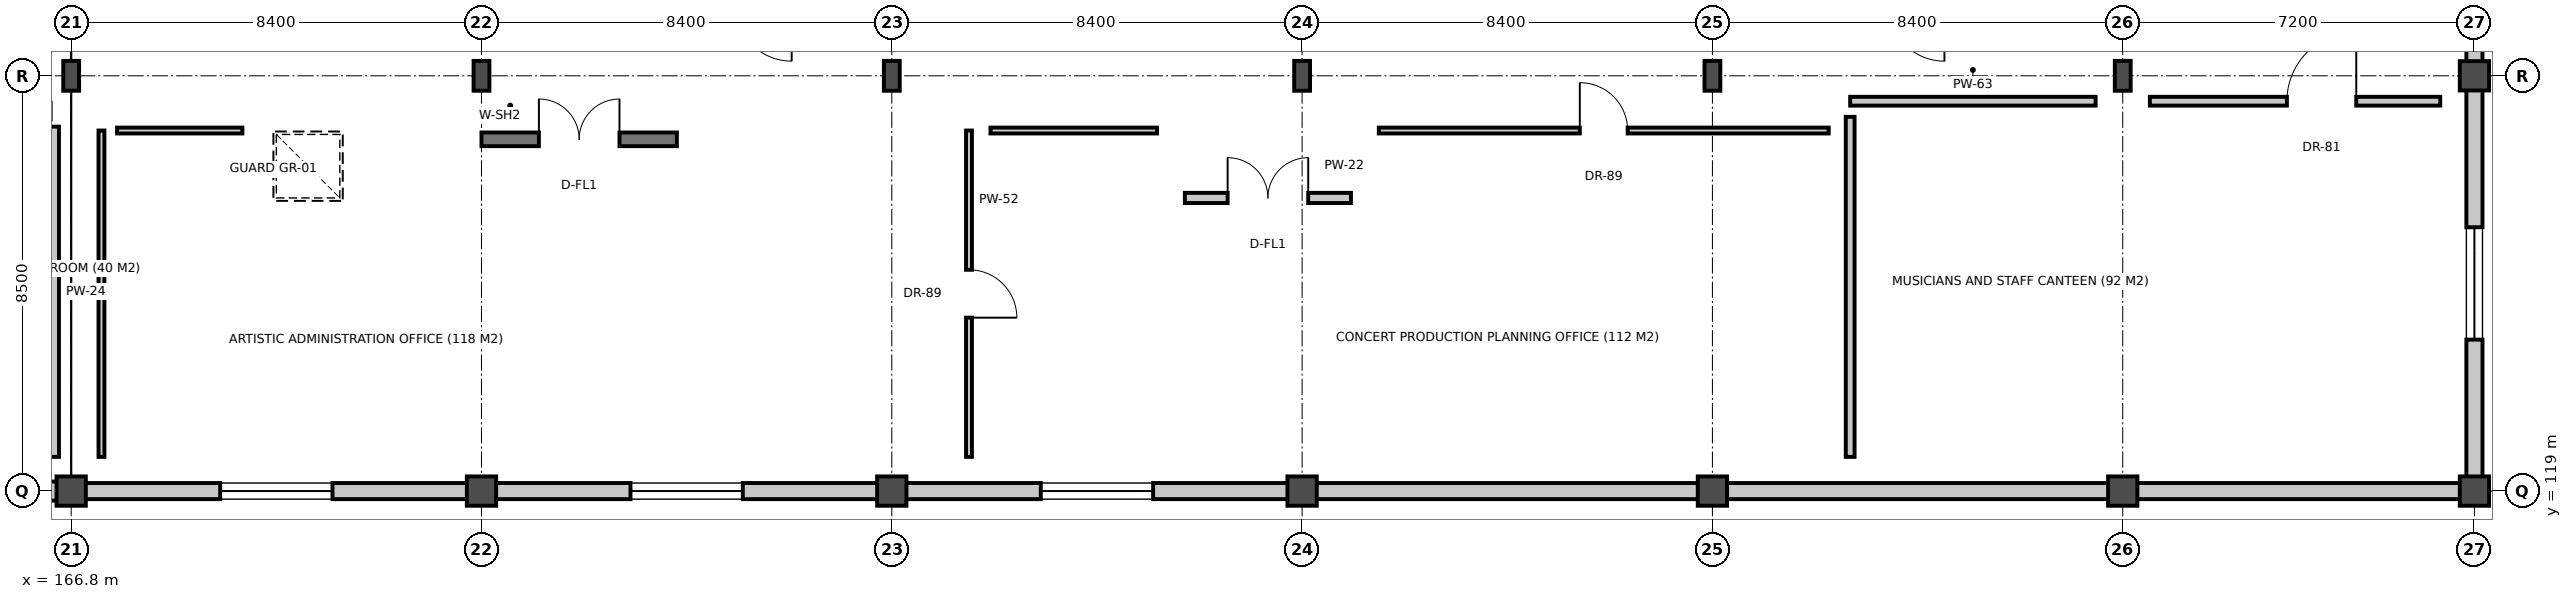
"""IFC4 building model, lengths in metres.
Left out: names, types, materials, properties, quantities, classifications, styles, units other than length and angle.
Written with IfcOpenShell. Run it as: python <this file> out.ifc"""

import sys

from ifc_helpers import new_model, si_unit, direction, frame, frame_2d, origin, origin_2d, place, context, subcontext, project, spatial, rectangle, i_section, extrude, element, fill, save


model = new_model("IFC4")
c1 = context("Model", 3, precision=1e-05, world=origin(), true_north=direction((0.0, 1.0)))
c2 = subcontext(c1, "Body", "Model", "MODEL_VIEW")
j1 = project(units=[si_unit("LENGTHUNIT", "METRE"), si_unit("PLANEANGLEUNIT", "RADIAN")], contexts=[c1])
p1 = place(None, origin())
s1 = spatial("IfcSite", under=j1, at=p1, CompositionType="ELEMENT")
p2 = place(p1, origin())
s2 = spatial("IfcBuilding", under=s1, at=p2, CompositionType="ELEMENT")
p3 = place(p2, frame((0.0, 0.0, 23.7)))
s3 = spatial("IfcBuildingStorey", under=s2, at=p3, CompositionType="ELEMENT", Elevation=23.7)
p4 = place(p3, frame((166.8, 119.0, 0.0), z_axis=(0.0, 0.0, 1.0), x_axis=(1.0, 0.0, 0.0)))
e1 = element("IfcColumn", 1, at=p4, inside=s3, PredefinedType="COLUMN", context=c2, shape_type="SweptSolid", body=[
    extrude(rectangle(XDim=0.6, YDim=0.6, at=origin_2d()), origin(), (0.0, 0.0, 1.0), 4.2),
])
p5 = place(p3, frame((166.8, 127.5, 0.0), z_axis=(0.0, 0.0, 1.0), x_axis=(1.0, 0.0, 0.0)))
e2 = element("IfcColumn", 2, at=p5, inside=s3, PredefinedType="COLUMN", context=c2, shape_type="SweptSolid", body=[
    extrude(i_section(OverallWidth=0.324, OverallDepth=0.611, WebThickness=0.013, FlangeThickness=0.019, at=origin_2d()), origin(), (0.0, 0.0, 1.0), 4.2),
])
p6 = place(p3, frame((175.2, 119.0, 0.0), z_axis=(0.0, 0.0, 1.0), x_axis=(1.0, 0.0, 0.0)))
e3 = element("IfcColumn", 3, at=p6, inside=s3, PredefinedType="COLUMN", context=c2, shape_type="SweptSolid", body=[
    extrude(rectangle(XDim=0.6, YDim=0.6, at=origin_2d()), origin(), (0.0, 0.0, 1.0), 4.2),
])
p7 = place(p3, frame((175.2, 127.5, 0.0), z_axis=(0.0, 0.0, 1.0), x_axis=(1.0, 0.0, 0.0)))
e4 = element("IfcColumn", 4, at=p7, inside=s3, PredefinedType="COLUMN", context=c2, shape_type="SweptSolid", body=[
    extrude(i_section(OverallWidth=0.324, OverallDepth=0.611, WebThickness=0.013, FlangeThickness=0.019, at=origin_2d()), origin(), (0.0, 0.0, 1.0), 4.2),
])
p8 = place(p3, frame((183.6, 119.0, 0.0), z_axis=(0.0, 0.0, 1.0), x_axis=(1.0, 0.0, 0.0)))
e5 = element("IfcColumn", 5, at=p8, inside=s3, PredefinedType="COLUMN", context=c2, shape_type="SweptSolid", body=[
    extrude(rectangle(XDim=0.6, YDim=0.6, at=origin_2d()), origin(), (0.0, 0.0, 1.0), 4.2),
])
p9 = place(p3, frame((183.6, 127.5, 0.0), z_axis=(0.0, 0.0, 1.0), x_axis=(1.0, 0.0, 0.0)))
e6 = element("IfcColumn", 6, at=p9, inside=s3, PredefinedType="COLUMN", context=c2, shape_type="SweptSolid", body=[
    extrude(i_section(OverallWidth=0.324, OverallDepth=0.611, WebThickness=0.013, FlangeThickness=0.019, at=origin_2d()), origin(), (0.0, 0.0, 1.0), 4.2),
])
p10 = place(p3, frame((192.0, 119.0, 0.0), z_axis=(0.0, 0.0, 1.0), x_axis=(1.0, 0.0, 0.0)))
e7 = element("IfcColumn", 7, at=p10, inside=s3, PredefinedType="COLUMN", context=c2, shape_type="SweptSolid", body=[
    extrude(rectangle(XDim=0.6, YDim=0.6, at=origin_2d()), origin(), (0.0, 0.0, 1.0), 4.2),
])
p11 = place(p3, frame((192.0, 127.5, 0.0), z_axis=(0.0, 0.0, 1.0), x_axis=(1.0, 0.0, 0.0)))
e8 = element("IfcColumn", 8, at=p11, inside=s3, PredefinedType="COLUMN", context=c2, shape_type="SweptSolid", body=[
    extrude(i_section(OverallWidth=0.324, OverallDepth=0.611, WebThickness=0.013, FlangeThickness=0.019, at=origin_2d()), origin(), (0.0, 0.0, 1.0), 4.2),
])
p12 = place(p3, frame((200.4, 119.0, 0.0), z_axis=(0.0, 0.0, 1.0), x_axis=(1.0, 0.0, 0.0)))
e9 = element("IfcColumn", 9, at=p12, inside=s3, PredefinedType="COLUMN", context=c2, shape_type="SweptSolid", body=[
    extrude(rectangle(XDim=0.6, YDim=0.6, at=origin_2d()), origin(), (0.0, 0.0, 1.0), 4.2),
])
p13 = place(p3, frame((200.4, 127.5, 0.0), z_axis=(0.0, 0.0, 1.0), x_axis=(1.0, 0.0, 0.0)))
e10 = element("IfcColumn", 10, at=p13, inside=s3, PredefinedType="COLUMN", context=c2, shape_type="SweptSolid", body=[
    extrude(i_section(OverallWidth=0.324, OverallDepth=0.611, WebThickness=0.013, FlangeThickness=0.019, at=origin_2d()), origin(), (0.0, 0.0, 1.0), 4.2),
])
p14 = place(p3, frame((208.8, 119.0, 0.0), z_axis=(0.0, 0.0, 1.0), x_axis=(1.0, 0.0, 0.0)))
e11 = element("IfcColumn", 11, at=p14, inside=s3, PredefinedType="COLUMN", context=c2, shape_type="SweptSolid", body=[
    extrude(rectangle(XDim=0.6, YDim=0.6, at=origin_2d()), origin(), (0.0, 0.0, 1.0), 4.2),
])
p15 = place(p3, frame((208.8, 127.5, 0.0), z_axis=(0.0, 0.0, 1.0), x_axis=(1.0, 0.0, 0.0)))
e12 = element("IfcColumn", 12, at=p15, inside=s3, PredefinedType="COLUMN", context=c2, shape_type="SweptSolid", body=[
    extrude(i_section(OverallWidth=0.324, OverallDepth=0.611, WebThickness=0.013, FlangeThickness=0.019, at=origin_2d()), origin(), (0.0, 0.0, 1.0), 4.2),
])
for number, where, z_axis, x_axis in (
    (13, (216.0, 119.0, 0.0), (0.0, 0.0, 1.0), (1.0, 0.0, 0.0)),
    (14, (216.0, 127.5, 0.0), (0.0, 0.0, 1.0), (1.0, 0.0, 0.0)),
):
    element("IfcColumn", number, at=place(p3, frame(where, z_axis=z_axis, x_axis=x_axis)), inside=s3, PredefinedType="COLUMN", context=c2, shape_type="SweptSolid", body=[
        extrude(rectangle(XDim=0.6, YDim=0.6, at=origin_2d()), origin(), (0.0, 0.0, 1.0), 4.2),
    ])
p16 = place(p3, frame((216.0, 127.22, 0.0), z_axis=(0.0, 0.0, 1.0), x_axis=(0.0, -1.0, 0.0)))
e15 = element("IfcWall", 15, at=p16, inside=s3, PredefinedType="SOLIDWALL", context=c2, shape_type="SweptSolid", body=[
    extrude(rectangle(XDim=7.94, YDim=0.33, at=frame_2d((3.97, 0.0))), origin(), (0.0, 0.0, 1.0), 3.154),
])
p17 = place(p16, frame((2.82, 0.0, 0.95)))
e16 = element("IfcOpeningElement", 16, at=p17, cuts=e15, PredefinedType="OPENING", context=c2, shape_type="SweptSolid", body=[
    extrude(rectangle(XDim=2.3, YDim=1.75, at=frame_2d((1.15, 0.875))), frame((0.0, 0.175, 0.0), z_axis=(0.0, -1.0, 0.0), x_axis=(1.0, 0.0, 0.0)), (0.0, 0.0, 1.0), 0.35),
])
p18 = place(p3, frame((216.0, 135.72, 0.0), z_axis=(0.0, 0.0, 1.0), x_axis=(0.0, -1.0, 0.0)))
e17 = element("IfcWall", 17, at=p18, inside=s3, PredefinedType="SOLIDWALL", context=c2, shape_type="SweptSolid", body=[
    extrude(rectangle(XDim=7.94, YDim=0.33, at=frame_2d((3.97, 0.0))), origin(), (0.0, 0.0, 1.0), 3.065),
])
p19 = place(p18, frame((2.82, 0.0, 0.95)))
e18 = element("IfcOpeningElement", 18, at=p19, cuts=e17, PredefinedType="OPENING", context=c2, shape_type="SweptSolid", body=[
    extrude(rectangle(XDim=2.3, YDim=1.75, at=frame_2d((1.15, 0.875))), frame((0.0, 0.175, 0.0), z_axis=(0.0, -1.0, 0.0), x_axis=(1.0, 0.0, 0.0)), (0.0, 0.0, 1.0), 0.35),
])
p20 = place(p3, frame((174.92, 119.0, 0.0), z_axis=(0.0, 0.0, 1.0), x_axis=(-1.0, 0.0, 0.0)))
e19 = element("IfcWall", 19, at=p20, inside=s3, PredefinedType="SOLIDWALL", context=c2, shape_type="SweptSolid", body=[
    extrude(rectangle(XDim=7.84, YDim=0.33, at=frame_2d((3.92, 0.0))), origin(), (0.0, 0.0, 1.0), 3.231),
])
p21 = place(p20, frame((2.77, 0.0, 0.95)))
e20 = element("IfcOpeningElement", 20, at=p21, cuts=e19, PredefinedType="OPENING", context=c2, shape_type="SweptSolid", body=[
    extrude(rectangle(XDim=2.3, YDim=1.75, at=frame_2d((1.15, 0.875))), frame((0.0, 0.175, 0.0), z_axis=(0.0, -1.0, 0.0), x_axis=(1.0, 0.0, 0.0)), (0.0, 0.0, 1.0), 0.35),
])
p22 = place(p3, frame((183.32, 119.0, 0.0), z_axis=(0.0, 0.0, 1.0), x_axis=(-1.0, 0.0, 0.0)))
e21 = element("IfcWall", 21, at=p22, inside=s3, PredefinedType="SOLIDWALL", context=c2, shape_type="SweptSolid", body=[
    extrude(rectangle(XDim=7.84, YDim=0.33, at=frame_2d((3.92, 0.0))), origin(), (0.0, 0.0, 1.0), 3.154),
])
p23 = place(p22, frame((2.77, 0.0, 0.95)))
e22 = element("IfcOpeningElement", 22, at=p23, cuts=e21, PredefinedType="OPENING", context=c2, shape_type="SweptSolid", body=[
    extrude(rectangle(XDim=2.3, YDim=1.75, at=frame_2d((1.15, 0.875))), frame((0.0, 0.175, 0.0), z_axis=(0.0, -1.0, 0.0), x_axis=(1.0, 0.0, 0.0)), (0.0, 0.0, 1.0), 0.35),
])
p24 = place(p3, frame((191.72, 119.0, 0.0), z_axis=(0.0, 0.0, 1.0), x_axis=(-1.0, 0.0, 0.0)))
e23 = element("IfcWall", 23, at=p24, inside=s3, PredefinedType="SOLIDWALL", context=c2, shape_type="SweptSolid", body=[
    extrude(rectangle(XDim=7.84, YDim=0.33, at=frame_2d((3.92, 0.0))), origin(), (0.0, 0.0, 1.0), 3.065),
])
p25 = place(p24, frame((2.77, 0.0, 0.95)))
e24 = element("IfcOpeningElement", 24, at=p25, cuts=e23, PredefinedType="OPENING", context=c2, shape_type="SweptSolid", body=[
    extrude(rectangle(XDim=2.3, YDim=1.75, at=frame_2d((1.15, 0.875))), frame((0.0, 0.175, 0.0), z_axis=(0.0, -1.0, 0.0), x_axis=(1.0, 0.0, 0.0)), (0.0, 0.0, 1.0), 0.35),
])
p26 = place(p3, frame((200.12, 119.0, 0.0), z_axis=(0.0, 0.0, 1.0), x_axis=(-1.0, 0.0, 0.0)))
e25 = element("IfcWall", 25, at=p26, inside=s3, PredefinedType="SOLIDWALL", context=c2, shape_type="SweptSolid", body=[
    extrude(rectangle(XDim=7.84, YDim=0.33, at=frame_2d((3.92, 0.0))), origin(), (0.0, 0.0, 1.0), 2.997),
])
p27 = place(p3, frame((208.52, 119.0, 0.0), z_axis=(0.0, 0.0, 1.0), x_axis=(-1.0, 0.0, 0.0)))
e26 = element("IfcWall", 26, at=p27, inside=s3, PredefinedType="SOLIDWALL", context=c2, shape_type="SweptSolid", body=[
    extrude(rectangle(XDim=7.84, YDim=0.33, at=frame_2d((3.92, 0.0))), origin(), (0.0, 0.0, 1.0), 2.898),
])
p28 = place(p3, frame((215.72, 119.0, 0.0), z_axis=(0.0, 0.0, 1.0), x_axis=(-1.0, 0.0, 0.0)))
e27 = element("IfcWall", 27, at=p28, inside=s3, PredefinedType="SOLIDWALL", context=c2, shape_type="SweptSolid", body=[
    extrude(rectangle(XDim=6.64, YDim=0.33, at=frame_2d((3.32, 0.0))), origin(), (0.0, 0.0, 1.0), 3.024),
])
p29 = place(p3, frame((166.52, 119.0, 0.0), z_axis=(0.0, 0.0, 1.0), x_axis=(-1.0, 0.0, 0.0)))
e28 = element("IfcWall", 28, at=p29, inside=s3, PredefinedType="SOLIDWALL", context=c2, shape_type="SweptSolid", body=[
    extrude(rectangle(XDim=7.84, YDim=0.39, at=frame_2d((3.92, 0.0))), origin(), (0.0, 0.0, 1.0), 3.174),
])
p30 = place(p29, frame((3.02, 0.0, 1.1)))
e29 = element("IfcOpeningElement", 29, at=p30, cuts=e28, PredefinedType="OPENING", context=c2, shape_type="SweptSolid", body=[
    extrude(rectangle(XDim=1.8, YDim=1.4, at=frame_2d((0.9, 0.7))), frame((0.0, 0.205, 0.0), z_axis=(0.0, -1.0, 0.0), x_axis=(1.0, 0.0, 0.0)), (0.0, 0.0, 1.0), 0.41),
])
p31 = place(p3, frame((175.2, 126.2, 0.0), z_axis=(0.0, 0.0, 1.0), x_axis=(1.0, 0.0, 0.0)))
e30 = element("IfcWall", 30, at=p31, inside=s3, PredefinedType="SHEAR", context=c2, shape_type="SweptSolid", body=[
    extrude(rectangle(XDim=4.0, YDim=0.28, at=frame_2d((2.0, 0.0))), origin(), (0.0, 0.0, 1.0), 2.898),
])
p32 = place(p31, frame((1.175, 0.0, 0.0)))
e31 = element("IfcOpeningElement", 31, at=p32, cuts=e30, PredefinedType="OPENING", context=c2, shape_type="SweptSolid", body=[
    extrude(rectangle(XDim=1.65, YDim=2.2, at=frame_2d((0.825, 1.1))), frame((0.0, 0.15, 0.0), z_axis=(0.0, -1.0, 0.0), x_axis=(1.0, 0.0, 0.0)), (0.0, 0.0, 1.0), 0.3),
])
p33 = place(p3, frame((189.6, 125.0, 0.0), z_axis=(0.0, 0.0, 1.0), x_axis=(1.0, 0.0, 0.0)))
e32 = element("IfcWall", 32, at=p33, inside=s3, PredefinedType="PARTITIONING", context=c2, shape_type="SweptSolid", body=[
    extrude(rectangle(XDim=3.4, YDim=0.208, at=frame_2d((1.7, 0.0))), origin(), (0.0, 0.0, 1.0), 3.316),
])
p34 = place(p33, frame((0.875, 0.0, 0.0)))
e33 = element("IfcOpeningElement", 33, at=p34, cuts=e32, PredefinedType="OPENING", context=c2, shape_type="SweptSolid", body=[
    extrude(rectangle(XDim=1.65, YDim=2.2, at=frame_2d((0.825, 1.1))), frame((0.0, 0.114, 0.0), z_axis=(0.0, -1.0, 0.0), x_axis=(1.0, 0.0, 0.0)), (0.0, 0.0, 1.0), 0.228),
])
p35 = place(p3, frame((166.38, 126.46, 0.0), z_axis=(0.0, 0.0, 1.0), x_axis=(0.0, -1.0, 0.0)))
e34 = element("IfcWall", 34, at=p35, inside=s3, PredefinedType="PARTITIONING", context=c2, shape_type="SweptSolid", body=[
    extrude(rectangle(XDim=6.76, YDim=0.34, at=frame_2d((3.38, 0.0))), origin(), (0.0, 0.0, 1.0), 2.86),
])
p36 = place(p3, frame((185.18, 126.38, 0.0), z_axis=(0.0, 0.0, 1.0), x_axis=(0.0, -1.0, 0.0)))
e35 = element("IfcWall", 35, at=p36, inside=s3, PredefinedType="PARTITIONING", context=c2, shape_type="SweptSolid", body=[
    extrude(rectangle(XDim=6.68, YDim=0.12, at=frame_2d((3.34, 0.0))), origin(), (0.0, 0.0, 1.0), 2.86),
])
p37 = place(p36, frame((2.85, 0.0, 0.0)))
e36 = element("IfcOpeningElement", 36, at=p37, cuts=e35, PredefinedType="OPENING", context=c2, shape_type="SweptSolid", body=[
    extrude(rectangle(XDim=0.98, YDim=2.16, at=frame_2d((0.49, 1.08))), frame((0.0, 0.07, 0.0), z_axis=(0.0, -1.0, 0.0), x_axis=(1.0, 0.0, 0.0)), (0.0, 0.0, 1.0), 0.14),
])
p38 = place(p3, frame((167.42, 119.7, 0.0), z_axis=(0.0, 0.0, 1.0), x_axis=(0.0, 1.0, 0.0)))
e37 = element("IfcWall", 37, at=p38, inside=s3, PredefinedType="PARTITIONING", context=c2, shape_type="SweptSolid", body=[
    extrude(rectangle(XDim=6.68, YDim=0.12, at=frame_2d((3.34, 0.0))), origin(), (0.0, 0.0, 1.0), 2.86),
])
p39 = place(p3, frame((167.74, 126.38, 0.0), z_axis=(0.0, 0.0, 1.0), x_axis=(1.0, 0.0, 0.0)))
e38 = element("IfcWall", 38, at=p39, inside=s3, PredefinedType="PARTITIONING", context=c2, shape_type="SweptSolid", body=[
    extrude(rectangle(XDim=2.565, YDim=0.12, at=frame_2d((1.283, 0.0))), origin(), (0.0, 0.0, 1.0), 2.86),
])
p40 = place(p3, frame((193.57, 126.38, 0.0), z_axis=(0.0, 0.0, 1.0), x_axis=(1.0, 0.0, 0.0)))
e39 = element("IfcWall", 39, at=p40, inside=s3, PredefinedType="PARTITIONING", context=c2, shape_type="SweptSolid", body=[
    extrude(rectangle(XDim=9.21, YDim=0.12, at=frame_2d((4.605, 0.0))), origin(), (0.0, 0.0, 1.0), 2.86),
])
p41 = place(p40, frame((4.115, 0.0, 0.0)))
e40 = element("IfcOpeningElement", 40, at=p41, cuts=e39, PredefinedType="OPENING", context=c2, shape_type="SweptSolid", body=[
    extrude(rectangle(XDim=0.98, YDim=2.16, at=frame_2d((0.49, 1.08))), frame((0.0, 0.07, 0.0), z_axis=(0.0, -1.0, 0.0), x_axis=(1.0, 0.0, 0.0)), (0.0, 0.0, 1.0), 0.14),
])
p42 = place(p3, frame((185.62, 126.38, 0.0), z_axis=(0.0, 0.0, 1.0), x_axis=(1.0, 0.0, 0.0)))
e41 = element("IfcWall", 41, at=p42, inside=s3, PredefinedType="PARTITIONING", context=c2, shape_type="SweptSolid", body=[
    extrude(rectangle(XDim=3.41, YDim=0.12, at=frame_2d((1.705, 0.0))), origin(), (0.0, 0.0, 1.0), 2.86),
])
p43 = place(p3, frame((203.22, 126.98, 0.0), z_axis=(0.0, 0.0, 1.0), x_axis=(1.0, 0.0, 0.0)))
e42 = element("IfcWall", 42, at=p43, inside=s3, PredefinedType="PARTITIONING", context=c2, shape_type="SweptSolid", body=[
    extrude(rectangle(XDim=5.024, YDim=0.18, at=frame_2d((2.512, 0.0))), origin(), (0.0, 0.0, 1.0), 2.86),
])
p44 = place(p3, frame((209.355, 126.98, 0.0), z_axis=(0.0, 0.0, 1.0), x_axis=(1.0, 0.0, 0.0)))
e43 = element("IfcWall", 43, at=p44, inside=s3, PredefinedType="PARTITIONING", context=c2, shape_type="SweptSolid", body=[
    extrude(rectangle(XDim=5.945, YDim=0.18, at=frame_2d((2.972, 0.0))), origin(), (0.0, 0.0, 1.0), 2.86),
])
p45 = place(p44, frame((2.805, 0.0, 0.0)))
e44 = element("IfcOpeningElement", 44, at=p45, cuts=e43, PredefinedType="OPENING", context=c2, shape_type="SweptSolid", body=[
    extrude(rectangle(XDim=1.42, YDim=2.34, at=frame_2d((0.71, 1.17))), frame((0.0, 0.1, 0.0), z_axis=(0.0, -1.0, 0.0), x_axis=(1.0, 0.0, 0.0)), (0.0, 0.0, 1.0), 0.2),
])
p46 = place(p3, frame((203.22, 119.7, 0.0), z_axis=(0.0, 0.0, 1.0), x_axis=(0.0, 1.0, 0.0)))
e45 = element("IfcWall", 45, at=p46, inside=s3, PredefinedType="PARTITIONING", context=c2, shape_type="SweptSolid", body=[
    extrude(rectangle(XDim=6.96, YDim=0.18, at=frame_2d((3.48, 0.0))), origin(), (0.0, 0.0, 1.0), 2.86),
])
p47 = place(p17, origin())
e46 = element("IfcWindow", 46, at=p47, inside=s3, PartitioningType="SINGLE_PANEL", PredefinedType="WINDOW", context=c2, shape_type="SweptSolid", body=[
    extrude(rectangle(XDim=2.3, YDim=1.75, at=frame_2d((1.15, 0.875))), frame((0.0, 0.03, 0.0), z_axis=(0.0, -1.0, 0.0), x_axis=(1.0, 0.0, 0.0)), (0.0, 0.0, 1.0), 0.06),
])
fill(e16, e46)
p48 = place(p21, origin())
e47 = element("IfcWindow", 47, at=p48, inside=s3, PartitioningType="SINGLE_PANEL", PredefinedType="WINDOW", context=c2, shape_type="SweptSolid", body=[
    extrude(rectangle(XDim=2.3, YDim=1.75, at=frame_2d((1.15, 0.875))), frame((0.0, 0.03, 0.0), z_axis=(0.0, -1.0, 0.0), x_axis=(1.0, 0.0, 0.0)), (0.0, 0.0, 1.0), 0.06),
])
fill(e20, e47)
p49 = place(p23, origin())
e48 = element("IfcWindow", 48, at=p49, inside=s3, PartitioningType="SINGLE_PANEL", PredefinedType="WINDOW", context=c2, shape_type="SweptSolid", body=[
    extrude(rectangle(XDim=2.3, YDim=1.75, at=frame_2d((1.15, 0.875))), frame((0.0, 0.03, 0.0), z_axis=(0.0, -1.0, 0.0), x_axis=(1.0, 0.0, 0.0)), (0.0, 0.0, 1.0), 0.06),
])
fill(e22, e48)
p50 = place(p25, origin())
e49 = element("IfcWindow", 49, at=p50, inside=s3, PartitioningType="SINGLE_PANEL", PredefinedType="WINDOW", context=c2, shape_type="SweptSolid", body=[
    extrude(rectangle(XDim=2.3, YDim=1.75, at=frame_2d((1.15, 0.875))), frame((0.0, 0.03, 0.0), z_axis=(0.0, -1.0, 0.0), x_axis=(1.0, 0.0, 0.0)), (0.0, 0.0, 1.0), 0.06),
])
fill(e24, e49)
p51 = place(p32, origin())
e50 = element("IfcDoor", 50, at=p51, inside=s3, OperationType="DOUBLE_DOOR_SINGLE_SWING", PredefinedType="DOOR", context=c2, shape_type="SweptSolid", body=[
    extrude(rectangle(XDim=1.65, YDim=2.2, at=frame_2d((0.825, 1.1))), frame((0.0, 0.025, 0.0), z_axis=(0.0, -1.0, 0.0), x_axis=(1.0, 0.0, 0.0)), (0.0, 0.0, 1.0), 0.05),
])
fill(e31, e50)
p52 = place(p34, origin())
e51 = element("IfcDoor", 51, at=p52, inside=s3, OperationType="DOUBLE_DOOR_SINGLE_SWING", PredefinedType="DOOR", context=c2, shape_type="SweptSolid", body=[
    extrude(rectangle(XDim=1.65, YDim=2.2, at=frame_2d((0.825, 1.1))), frame((0.0, 0.025, 0.0), z_axis=(0.0, -1.0, 0.0), x_axis=(1.0, 0.0, 0.0)), (0.0, 0.0, 1.0), 0.05),
])
fill(e33, e51)
p53 = place(p37, origin())
e52 = element("IfcDoor", 52, at=p53, inside=s3, OperationType="SINGLE_SWING_RIGHT", PredefinedType="DOOR", context=c2, shape_type="SweptSolid", body=[
    extrude(rectangle(XDim=0.98, YDim=2.16, at=frame_2d((0.49, 1.08))), frame((0.0, 0.025, 0.0), z_axis=(0.0, -1.0, 0.0), x_axis=(1.0, 0.0, 0.0)), (0.0, 0.0, 1.0), 0.05),
])
fill(e36, e52)
p54 = place(p41, origin())
e53 = element("IfcDoor", 53, at=p54, inside=s3, OperationType="SINGLE_SWING_LEFT", PredefinedType="DOOR", context=c2, shape_type="SweptSolid", body=[
    extrude(rectangle(XDim=0.98, YDim=2.16, at=frame_2d((0.49, 1.08))), frame((0.0, 0.025, 0.0), z_axis=(0.0, -1.0, 0.0), x_axis=(1.0, 0.0, 0.0)), (0.0, 0.0, 1.0), 0.05),
])
fill(e40, e53)
p55 = place(p45, origin())
e54 = element("IfcDoor", 54, at=p55, inside=s3, OperationType="SINGLE_SWING_RIGHT", PredefinedType="DOOR", context=c2, shape_type="SweptSolid", body=[
    extrude(rectangle(XDim=1.42, YDim=2.34, at=frame_2d((0.71, 1.17))), frame((0.0, 0.025, 0.0), z_axis=(0.0, -1.0, 0.0), x_axis=(1.0, 0.0, 0.0)), (0.0, 0.0, 1.0), 0.05),
])
fill(e44, e54)
save(model, sys.argv[1])
